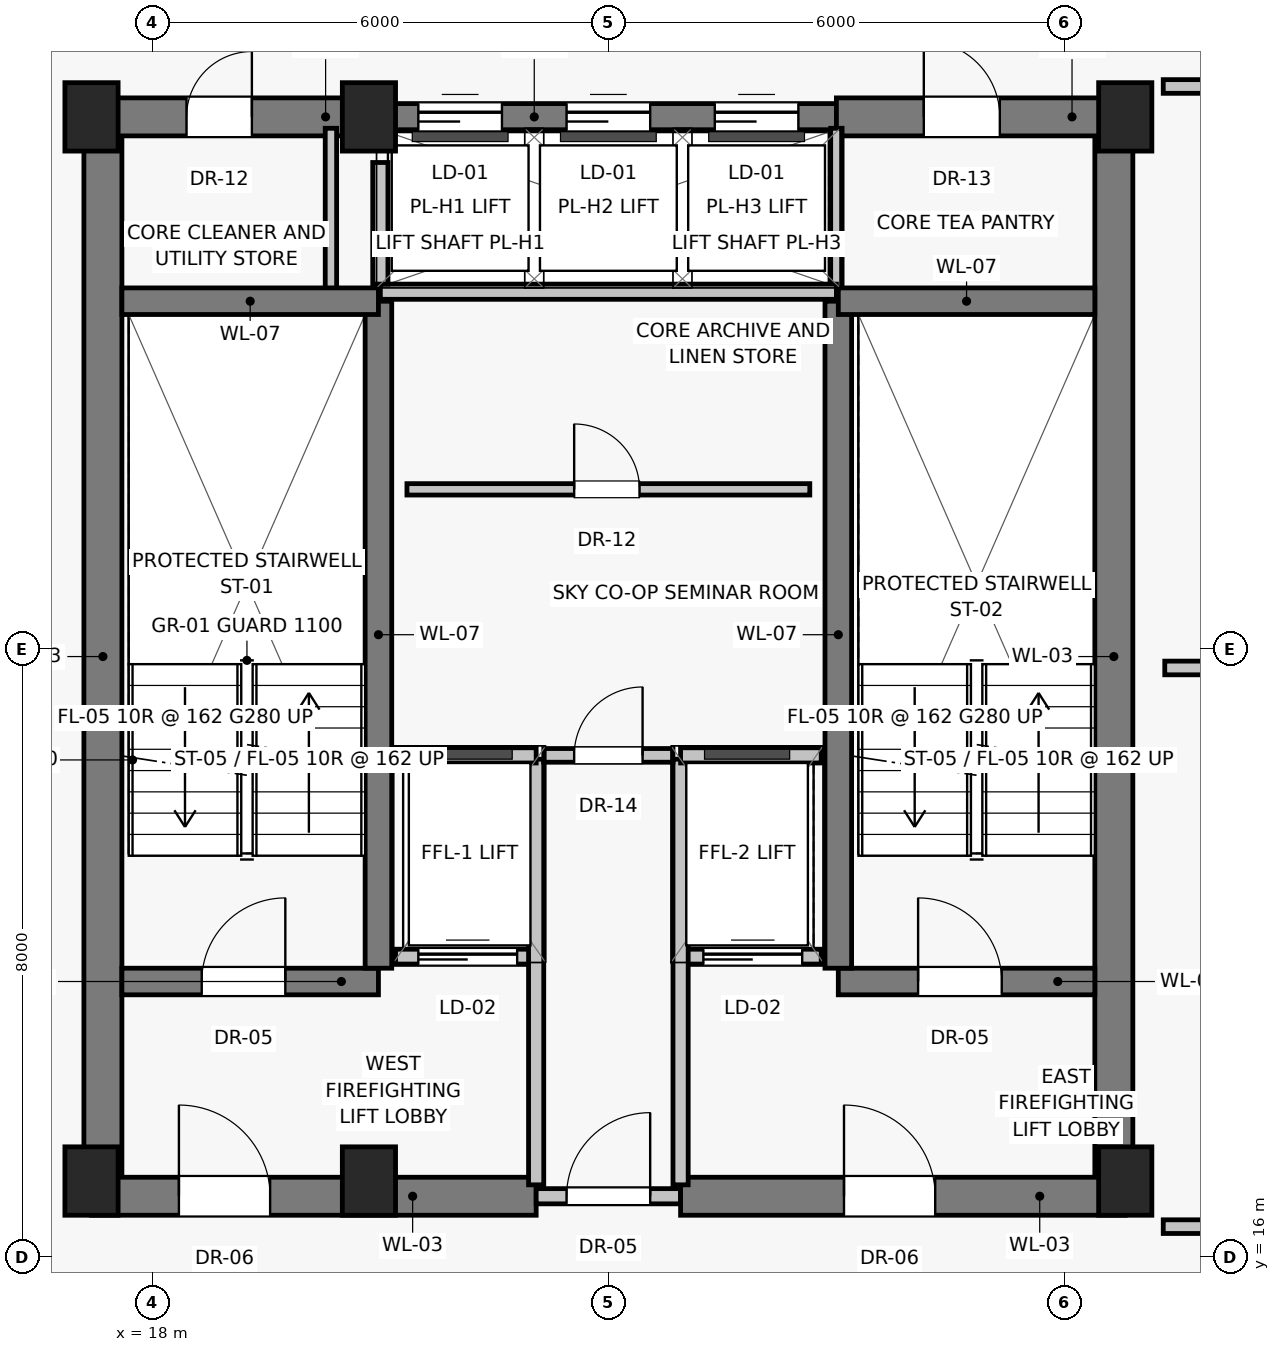
"""IFC4 building model, lengths in metres.
Left out: names, types, materials, properties, quantities, classifications, styles, units other than length and angle.
Written with IfcOpenShell. Run it as: python <this file> out.ifc"""

import sys

from ifc_helpers import new_model, si_unit, direction, frame, frame_2d, origin, origin_2d, place, context, subcontext, project, spatial, rectangle, extrude, source, transform, mapped, element, fill, save


model = new_model("IFC4")
c1 = context("Model", 3, precision=1e-05, world=origin(), true_north=direction((0.0, 1.0)))
c2 = subcontext(c1, "Body", "Model", "MODEL_VIEW")
j1 = project(units=[si_unit("LENGTHUNIT", "METRE"), si_unit("PLANEANGLEUNIT", "RADIAN")], contexts=[c1])
p1 = place(None, origin())
s1 = spatial("IfcSite", under=j1, at=p1, CompositionType="ELEMENT")
p2 = place(p1, origin())
s2 = spatial("IfcBuilding", under=s1, at=p2, CompositionType="ELEMENT")
p3 = place(p2, frame((0.0, 0.0, 201.6)))
s3 = spatial("IfcBuildingStorey", under=s2, at=p3, CompositionType="ELEMENT", Elevation=201.6)
for number, where, z_axis, x_axis in (
    (1, (17.2, 17.0, 0.0), (0.0, 0.0, 1.0), (1.0, 0.0, 0.0)),
    (2, (20.85, 17.0, 0.0), (0.0, 0.0, 1.0), (1.0, 0.0, 0.0)),
    (3, (30.8, 17.0, 0.0), (0.0, 0.0, 1.0), (1.0, 0.0, 0.0)),
    (4, (17.2, 31.0, 0.0), (0.0, 0.0, 1.0), (1.0, 0.0, 0.0)),
    (5, (20.85, 31.0, 0.0), (0.0, 0.0, 1.0), (1.0, 0.0, 0.0)),
    (6, (30.8, 31.0, 0.0), (0.0, 0.0, 1.0), (1.0, 0.0, 0.0)),
):
    element("IfcColumn", number, at=place(p3, frame(where, z_axis=z_axis, x_axis=x_axis)), inside=s3, PredefinedType="PILASTER", context=c2, shape_type="SweptSolid", body=[
        extrude(rectangle(XDim=0.7, YDim=0.9, at=origin_2d()), origin(), (0.0, 0.0, 1.0), 3.25),
    ])
for number, where, z_axis, x_axis in (
    (7, (17.35, 16.8, 0.0), (0.0, 0.0, 1.0), (0.0, 1.0, 0.0)),
    (8, (30.65, 16.8, 0.0), (0.0, 0.0, 1.0), (0.0, 1.0, 0.0)),
):
    element("IfcWall", number, at=place(p3, frame(where, z_axis=z_axis, x_axis=x_axis)), inside=s3, PredefinedType="SHEAR", context=c2, shape_type="SweptSolid", body=[
        extrude(rectangle(XDim=14.2, YDim=0.5, at=frame_2d((7.1, 0.0))), origin(), (0.0, 0.0, 1.0), 3.015),
    ])
p4 = place(p3, frame((17.2, 16.8, 0.0), z_axis=(0.0, 0.0, 1.0), x_axis=(1.0, 0.0, 0.0)))
e9 = element("IfcWall", 9, at=p4, inside=s3, PredefinedType="SHEAR", context=c2, shape_type="SweptSolid", body=[
    extrude(rectangle(XDim=5.85, YDim=0.5, at=frame_2d((2.925, 0.0))), origin(), (0.0, 0.0, 1.0), 3.015),
])
p5 = place(p4, frame((1.15, 0.0, 0.0)))
e10 = element("IfcOpeningElement", 10, at=p5, cuts=e9, PredefinedType="OPENING", context=c2, shape_type="SweptSolid", body=[
    extrude(rectangle(XDim=1.2, YDim=2.03, at=frame_2d((0.6, 1.015))), frame((0.0, 0.26, 0.0), z_axis=(0.0, -1.0, 0.0), x_axis=(1.0, 0.0, 0.0)), (0.0, 0.0, 1.0), 0.52),
])
p6 = place(p3, frame((23.05, 16.8, 0.0), z_axis=(0.0, 0.0, 1.0), x_axis=(1.0, 0.0, 0.0)))
e11 = element("IfcWall", 11, at=p6, inside=s3, PredefinedType="SOLIDWALL", context=c2, shape_type="SweptSolid", body=[
    extrude(rectangle(XDim=1.9, YDim=0.2, at=frame_2d((0.95, 0.0))), origin(), (0.0, 0.0, 1.0), 2.165),
])
p7 = place(p6, frame((0.4, 0.0, 0.0)))
e12 = element("IfcOpeningElement", 12, at=p7, cuts=e11, PredefinedType="OPENING", context=c2, shape_type="SweptSolid", body=[
    extrude(rectangle(XDim=1.1, YDim=2.03, at=frame_2d((0.55, 1.015))), frame((0.0, 0.11, 0.0), z_axis=(0.0, -1.0, 0.0), x_axis=(1.0, 0.0, 0.0)), (0.0, 0.0, 1.0), 0.22),
])
p8 = place(p3, frame((24.95, 16.8, 0.0), z_axis=(0.0, 0.0, 1.0), x_axis=(1.0, 0.0, 0.0)))
e13 = element("IfcWall", 13, at=p8, inside=s3, PredefinedType="SHEAR", context=c2, shape_type="SweptSolid", body=[
    extrude(rectangle(XDim=5.85, YDim=0.5, at=frame_2d((2.925, 0.0))), origin(), (0.0, 0.0, 1.0), 3.015),
])
p9 = place(p8, frame((2.15, 0.0, 0.0)))
e14 = element("IfcOpeningElement", 14, at=p9, cuts=e13, PredefinedType="OPENING", context=c2, shape_type="SweptSolid", body=[
    extrude(rectangle(XDim=1.2, YDim=2.03, at=frame_2d((0.6, 1.015))), frame((0.0, 0.26, 0.0), z_axis=(0.0, -1.0, 0.0), x_axis=(1.0, 0.0, 0.0)), (0.0, 0.0, 1.0), 0.52),
])
p10 = place(p3, frame((17.2, 31.0, 0.0), z_axis=(0.0, 0.0, 1.0), x_axis=(1.0, 0.0, 0.0)))
e15 = element("IfcWall", 15, at=p10, inside=s3, PredefinedType="SHEAR", context=c2, shape_type="SweptSolid", body=[
    extrude(rectangle(XDim=3.8, YDim=0.5, at=frame_2d((1.9, 0.0))), origin(), (0.0, 0.0, 1.0), 3.015),
])
p11 = place(p10, frame((1.25, 0.0, 0.0)))
e16 = element("IfcOpeningElement", 16, at=p11, cuts=e15, PredefinedType="OPENING", context=c2, shape_type="SweptSolid", body=[
    extrude(rectangle(XDim=0.86, YDim=2.01, at=frame_2d((0.43, 1.005))), frame((0.0, 0.26, 0.0), z_axis=(0.0, -1.0, 0.0), x_axis=(1.0, 0.0, 0.0)), (0.0, 0.0, 1.0), 0.52),
])
p12 = place(p3, frame((21.0, 31.0, 0.0), z_axis=(0.0, 0.0, 1.0), x_axis=(1.0, 0.0, 0.0)))
e17 = element("IfcWall", 17, at=p12, inside=s3, PredefinedType="SHEAR", context=c2, shape_type="SweptSolid", body=[
    extrude(rectangle(XDim=6.0, YDim=0.35, at=frame_2d((3.0, 0.0))), origin(), (0.0, 0.0, 1.0), 3.015),
])
p13 = place(p12, frame((0.5, 0.0, 0.0)))
e18 = element("IfcOpeningElement", 18, at=p13, cuts=e17, PredefinedType="OPENING", context=c2, shape_type="SweptSolid", body=[
    extrude(rectangle(XDim=1.1, YDim=2.08, at=frame_2d((0.55, 1.04))), frame((0.0, 0.185, 0.0), z_axis=(0.0, -1.0, 0.0), x_axis=(1.0, 0.0, 0.0)), (0.0, 0.0, 1.0), 0.37),
])
p14 = place(p12, frame((2.45, 0.0, 0.0)))
e19 = element("IfcOpeningElement", 19, at=p14, cuts=e17, PredefinedType="OPENING", context=c2, shape_type="SweptSolid", body=[
    extrude(rectangle(XDim=1.1, YDim=2.08, at=frame_2d((0.55, 1.04))), frame((0.0, 0.185, 0.0), z_axis=(0.0, -1.0, 0.0), x_axis=(1.0, 0.0, 0.0)), (0.0, 0.0, 1.0), 0.37),
])
p15 = place(p12, frame((4.4, 0.0, 0.0)))
e20 = element("IfcOpeningElement", 20, at=p15, cuts=e17, PredefinedType="OPENING", context=c2, shape_type="SweptSolid", body=[
    extrude(rectangle(XDim=1.1, YDim=2.08, at=frame_2d((0.55, 1.04))), frame((0.0, 0.185, 0.0), z_axis=(0.0, -1.0, 0.0), x_axis=(1.0, 0.0, 0.0)), (0.0, 0.0, 1.0), 0.37),
])
p16 = place(p3, frame((27.0, 31.0, 0.0), z_axis=(0.0, 0.0, 1.0), x_axis=(1.0, 0.0, 0.0)))
e21 = element("IfcWall", 21, at=p16, inside=s3, PredefinedType="SHEAR", context=c2, shape_type="SweptSolid", body=[
    extrude(rectangle(XDim=3.8, YDim=0.5, at=frame_2d((1.9, 0.0))), origin(), (0.0, 0.0, 1.0), 3.015),
])
p17 = place(p16, frame((1.15, 0.0, 0.0)))
e22 = element("IfcOpeningElement", 22, at=p17, cuts=e21, PredefinedType="OPENING", context=c2, shape_type="SweptSolid", body=[
    extrude(rectangle(XDim=1.0, YDim=2.01, at=frame_2d((0.5, 1.005))), frame((0.0, 0.26, 0.0), z_axis=(0.0, -1.0, 0.0), x_axis=(1.0, 0.0, 0.0)), (0.0, 0.0, 1.0), 0.52),
])
for number, where, z_axis, x_axis in (
    (23, (20.35, 28.65, 0.0), (0.0, 0.0, 1.0), (0.0, 1.0, 0.0)),
    (24, (27.0, 28.65, 0.0), (0.0, 0.0, 1.0), (0.0, 1.0, 0.0)),
):
    element("IfcWall", number, at=place(p3, frame(where, z_axis=z_axis, x_axis=x_axis)), inside=s3, PredefinedType="PARTITIONING", context=c2, shape_type="SweptSolid", body=[
        extrude(rectangle(XDim=2.2, YDim=0.15, at=frame_2d((1.1, 0.0))), origin(), (0.0, 0.0, 1.0), 3.015),
    ])
p18 = place(p3, frame((17.6, 19.625, 0.0), z_axis=(0.0, 0.0, 1.0), x_axis=(1.0, 0.0, 0.0)))
e25 = element("IfcWall", 25, at=p18, inside=s3, PredefinedType="SHEAR", context=c2, shape_type="SweptSolid", body=[
    extrude(rectangle(XDim=3.375, YDim=0.35, at=frame_2d((1.688, 0.0))), origin(), (0.0, 0.0, 1.0), 3.015),
])
p19 = place(p18, frame((1.05, 0.0, 0.0)))
e26 = element("IfcOpeningElement", 26, at=p19, cuts=e25, PredefinedType="OPENING", context=c2, shape_type="SweptSolid", body=[
    extrude(rectangle(XDim=1.1, YDim=2.03, at=frame_2d((0.55, 1.015))), frame((0.0, 0.185, 0.0), z_axis=(0.0, -1.0, 0.0), x_axis=(1.0, 0.0, 0.0)), (0.0, 0.0, 1.0), 0.37),
])
p20 = place(p3, frame((21.2, 19.95, 0.0), z_axis=(0.0, 0.0, 1.0), x_axis=(1.0, 0.0, 0.0)))
e27 = element("IfcWall", 27, at=p20, inside=s3, PredefinedType="SOLIDWALL", context=c2, shape_type="SweptSolid", body=[
    extrude(rectangle(XDim=1.85, YDim=0.2, at=frame_2d((0.925, 0.0))), origin(), (0.0, 0.0, 1.0), 3.015),
])
p21 = place(p20, frame((0.3, 0.0, 0.0)))
e28 = element("IfcOpeningElement", 28, at=p21, cuts=e27, PredefinedType="OPENING", context=c2, shape_type="SweptSolid", body=[
    extrude(rectangle(XDim=1.3, YDim=2.25, at=frame_2d((0.65, 1.125))), frame((0.0, 0.11, 0.0), z_axis=(0.0, -1.0, 0.0), x_axis=(1.0, 0.0, 0.0)), (0.0, 0.0, 1.0), 0.22),
])
p22 = place(p3, frame((24.95, 19.95, 0.0), z_axis=(0.0, 0.0, 1.0), x_axis=(1.0, 0.0, 0.0)))
e29 = element("IfcWall", 29, at=p22, inside=s3, PredefinedType="SOLIDWALL", context=c2, shape_type="SweptSolid", body=[
    extrude(rectangle(XDim=1.85, YDim=0.2, at=frame_2d((0.925, 0.0))), origin(), (0.0, 0.0, 1.0), 3.015),
])
p23 = place(p22, frame((0.3, 0.0, 0.0)))
e30 = element("IfcOpeningElement", 30, at=p23, cuts=e29, PredefinedType="OPENING", context=c2, shape_type="SweptSolid", body=[
    extrude(rectangle(XDim=1.3, YDim=2.25, at=frame_2d((0.65, 1.125))), frame((0.0, 0.11, 0.0), z_axis=(0.0, -1.0, 0.0), x_axis=(1.0, 0.0, 0.0)), (0.0, 0.0, 1.0), 0.22),
])
p24 = place(p3, frame((27.025, 19.625, 0.0), z_axis=(0.0, 0.0, 1.0), x_axis=(1.0, 0.0, 0.0)))
e31 = element("IfcWall", 31, at=p24, inside=s3, PredefinedType="SHEAR", context=c2, shape_type="SweptSolid", body=[
    extrude(rectangle(XDim=3.375, YDim=0.35, at=frame_2d((1.688, 0.0))), origin(), (0.0, 0.0, 1.0), 3.015),
])
p25 = place(p24, frame((1.05, 0.0, 0.0)))
e32 = element("IfcOpeningElement", 32, at=p25, cuts=e31, PredefinedType="OPENING", context=c2, shape_type="SweptSolid", body=[
    extrude(rectangle(XDim=1.1, YDim=2.03, at=frame_2d((0.55, 1.015))), frame((0.0, 0.185, 0.0), z_axis=(0.0, -1.0, 0.0), x_axis=(1.0, 0.0, 0.0)), (0.0, 0.0, 1.0), 0.37),
])
for number, where, z_axis, x_axis in (
    (33, (20.975, 19.8, 0.0), (0.0, 0.0, 1.0), (0.0, 1.0, 0.0)),
    (34, (27.025, 19.8, 0.0), (0.0, 0.0, 1.0), (0.0, 1.0, 0.0)),
):
    element("IfcWall", number, at=place(p3, frame(where, z_axis=z_axis, x_axis=x_axis)), inside=s3, PredefinedType="SHEAR", context=c2, shape_type="SweptSolid", body=[
        extrude(rectangle(XDim=8.775, YDim=0.35, at=frame_2d((4.387, 0.0))), origin(), (0.0, 0.0, 1.0), 3.015),
    ])
for number, where, z_axis, x_axis in (
    (35, (17.6, 28.575, 0.0), (0.0, 0.0, 1.0), (1.0, 0.0, 0.0)),
    (36, (27.025, 28.575, 0.0), (0.0, 0.0, 1.0), (1.0, 0.0, 0.0)),
):
    element("IfcWall", number, at=place(p3, frame(where, z_axis=z_axis, x_axis=x_axis)), inside=s3, PredefinedType="SHEAR", context=c2, shape_type="SweptSolid", body=[
        extrude(rectangle(XDim=3.375, YDim=0.35, at=frame_2d((1.688, 0.0))), origin(), (0.0, 0.0, 1.0), 3.015),
    ])
for number, where, z_axis, x_axis in (
    (37, (23.05, 16.95, 0.0), (0.0, 0.0, 1.0), (0.0, 1.0, 0.0)),
    (38, (24.95, 16.95, 0.0), (0.0, 0.0, 1.0), (0.0, 1.0, 0.0)),
):
    element("IfcWall", number, at=place(p3, frame(where, z_axis=z_axis, x_axis=x_axis)), inside=s3, PredefinedType="SOLIDWALL", context=c2, shape_type="SweptSolid", body=[
        extrude(rectangle(XDim=5.6, YDim=0.2, at=frame_2d((2.8, 0.0))), origin(), (0.0, 0.0, 1.0), 3.015),
    ])
for number, where, z_axis, x_axis in (
    (39, (21.2, 22.6, 0.0), (0.0, 0.0, 1.0), (1.0, 0.0, 0.0)),
    (40, (24.95, 22.6, 0.0), (0.0, 0.0, 1.0), (1.0, 0.0, 0.0)),
):
    element("IfcWall", number, at=place(p3, frame(where, z_axis=z_axis, x_axis=x_axis)), inside=s3, PredefinedType="SOLIDWALL", context=c2, shape_type="SweptSolid", body=[
        extrude(rectangle(XDim=1.85, YDim=0.2, at=frame_2d((0.925, 0.0))), origin(), (0.0, 0.0, 1.0), 3.015),
    ])
p26 = place(p3, frame((21.0, 28.7, 0.0), z_axis=(0.0, 0.0, 1.0), x_axis=(1.0, 0.0, 0.0)))
e41 = element("IfcWall", 41, at=p26, inside=s3, PredefinedType="SOLIDWALL", context=c2, shape_type="SweptSolid", body=[
    extrude(rectangle(XDim=6.0, YDim=0.2, at=frame_2d((3.0, 0.0))), origin(), (0.0, 0.0, 1.0), 3.015),
])
p27 = place(p3, frame((21.0, 28.8, 0.0), z_axis=(0.0, 0.0, 1.0), x_axis=(0.0, 1.0, 0.0)))
e42 = element("IfcWall", 42, at=p27, inside=s3, PredefinedType="SOLIDWALL", context=c2, shape_type="SweptSolid", body=[
    extrude(rectangle(XDim=1.6, YDim=0.2, at=frame_2d((0.8, 0.0))), origin(), (0.0, 0.0, 1.0), 3.015),
])
p28 = place(p3, frame((23.15, 22.6, 0.0), z_axis=(0.0, 0.0, 1.0), x_axis=(1.0, 0.0, 0.0)))
e43 = element("IfcWall", 43, at=p28, inside=s3, PredefinedType="PARTITIONING", context=c2, shape_type="SweptSolid", body=[
    extrude(rectangle(XDim=1.7, YDim=0.18, at=frame_2d((0.85, 0.0))), origin(), (0.0, 0.0, 1.0), 3.015),
])
p29 = place(p28, frame((0.4, 0.0, 0.0)))
e44 = element("IfcOpeningElement", 44, at=p29, cuts=e43, PredefinedType="OPENING", context=c2, shape_type="SweptSolid", body=[
    extrude(rectangle(XDim=0.9, YDim=2.01, at=frame_2d((0.45, 1.005))), frame((0.0, 0.1, 0.0), z_axis=(0.0, -1.0, 0.0), x_axis=(1.0, 0.0, 0.0)), (0.0, 0.0, 1.0), 0.2),
])
p30 = place(p3, frame((21.35, 26.1, 0.0), z_axis=(0.0, 0.0, 1.0), x_axis=(1.0, 0.0, 0.0)))
e45 = element("IfcWall", 45, at=p30, inside=s3, PredefinedType="PARTITIONING", context=c2, shape_type="SweptSolid", body=[
    extrude(rectangle(XDim=5.3, YDim=0.15, at=frame_2d((2.65, 0.0))), origin(), (0.0, 0.0, 1.0), 3.015),
])
p31 = place(p30, frame((2.2, 0.0, 0.0)))
e46 = element("IfcOpeningElement", 46, at=p31, cuts=e45, PredefinedType="OPENING", context=c2, shape_type="SweptSolid", body=[
    extrude(rectangle(XDim=0.86, YDim=2.01, at=frame_2d((0.43, 1.005))), frame((0.0, 0.085, 0.0), z_axis=(0.0, -1.0, 0.0), x_axis=(1.0, 0.0, 0.0)), (0.0, 0.0, 1.0), 0.17),
])
p32 = place(p3, frame((31.32, 23.75, 0.0), z_axis=(0.0, 0.0, 1.0), x_axis=(1.0, 0.0, 0.0)))
e47 = element("IfcWall", 47, at=p32, inside=s3, PredefinedType="PARTITIONING", context=c2, shape_type="SweptSolid", body=[
    extrude(rectangle(XDim=10.431, YDim=0.18, at=frame_2d((5.216, 0.0))), origin(), (0.0, 0.0, 1.0), 3.015),
])
p33 = place(p3, frame((31.3, 16.4, 0.0), z_axis=(0.0, 0.0, 1.0), x_axis=(1.0, 0.0, 0.0)))
e48 = element("IfcWall", 48, at=p33, inside=s3, PredefinedType="PARTITIONING", context=c2, shape_type="SweptSolid", body=[
    extrude(rectangle(XDim=1.92, YDim=0.18, at=frame_2d((0.96, 0.0))), origin(), (0.0, 0.0, 1.0), 3.015),
])
p34 = place(p33, frame((0.72, 0.0, 0.0)))
e49 = element("IfcOpeningElement", 49, at=p34, cuts=e48, PredefinedType="OPENING", context=c2, shape_type="SweptSolid", body=[
    extrude(rectangle(XDim=1.0, YDim=2.01, at=frame_2d((0.5, 1.005))), frame((0.0, 0.1, 0.0), z_axis=(0.0, -1.0, 0.0), x_axis=(1.0, 0.0, 0.0)), (0.0, 0.0, 1.0), 0.2),
])
p35 = place(p3, frame((31.3, 31.4, 0.0), z_axis=(0.0, 0.0, 1.0), x_axis=(1.0, 0.0, 0.0)))
e50 = element("IfcWall", 50, at=p35, inside=s3, PredefinedType="PARTITIONING", context=c2, shape_type="SweptSolid", body=[
    extrude(rectangle(XDim=1.92, YDim=0.18, at=frame_2d((0.96, 0.0))), origin(), (0.0, 0.0, 1.0), 3.015),
])
p36 = place(p35, frame((0.72, 0.0, 0.0)))
e51 = element("IfcOpeningElement", 51, at=p36, cuts=e50, PredefinedType="OPENING", context=c2, shape_type="SweptSolid", body=[
    extrude(rectangle(XDim=1.0, YDim=2.01, at=frame_2d((0.5, 1.005))), frame((0.0, 0.1, 0.0), z_axis=(0.0, -1.0, 0.0), x_axis=(1.0, 0.0, 0.0)), (0.0, 0.0, 1.0), 0.2),
])
m1 = source(origin(), c2, "Body", "SweptSolid", [
    extrude(rectangle(XDim=1.2, YDim=2.03, at=frame_2d((0.6, 1.015))), frame((0.0, 0.025, 0.0), z_axis=(0.0, -1.0, 0.0), x_axis=(1.0, 0.0, 0.0)), (0.0, 0.0, 1.0), 0.05),
])
p37 = place(p5, origin())
e52 = element("IfcDoor", 52, at=p37, inside=s3, OperationType="SINGLE_SWING_LEFT", PredefinedType="DOOR", context=c2, shape_type="MappedRepresentation", body=[
    mapped(m1, transform((0.0, 0.0, 0.0), scale=1.0)),
])
fill(e10, e52)
m2 = source(origin(), c2, "Body", "SweptSolid", [
    extrude(rectangle(XDim=1.1, YDim=2.03, at=frame_2d((0.55, 1.015))), frame((0.0, 0.025, 0.0), z_axis=(0.0, -1.0, 0.0), x_axis=(1.0, 0.0, 0.0)), (0.0, 0.0, 1.0), 0.05),
])
p38 = place(p7, origin())
e53 = element("IfcDoor", 53, at=p38, inside=s3, OperationType="SINGLE_SWING_RIGHT", PredefinedType="DOOR", context=c2, shape_type="MappedRepresentation", body=[
    mapped(m2, transform((0.0, 0.0, 0.0), scale=1.0)),
])
fill(e12, e53)
p39 = place(p9, origin())
e54 = element("IfcDoor", 54, at=p39, inside=s3, OperationType="SINGLE_SWING_LEFT", PredefinedType="DOOR", context=c2, shape_type="MappedRepresentation", body=[
    mapped(m1, transform((0.0, 0.0, 0.0), scale=1.0)),
])
fill(e14, e54)
m3 = source(origin(), c2, "Body", "SweptSolid", [
    extrude(rectangle(XDim=0.86, YDim=2.01, at=frame_2d((0.43, 1.005))), frame((0.0, 0.025, 0.0), z_axis=(0.0, -1.0, 0.0), x_axis=(1.0, 0.0, 0.0)), (0.0, 0.0, 1.0), 0.05),
])
p40 = place(p11, origin())
e55 = element("IfcDoor", 55, at=p40, inside=s3, OperationType="SINGLE_SWING_RIGHT", PredefinedType="DOOR", context=c2, shape_type="MappedRepresentation", body=[
    mapped(m3, transform((0.0, 0.0, 0.0), scale=1.0)),
])
fill(e16, e55)
m4 = source(origin(), c2, "Body", "SweptSolid", [
    extrude(rectangle(XDim=1.1, YDim=2.08, at=frame_2d((0.55, 1.04))), frame((0.0, 0.025, 0.0), z_axis=(0.0, -1.0, 0.0), x_axis=(1.0, 0.0, 0.0)), (0.0, 0.0, 1.0), 0.05),
])
p41 = place(p13, origin())
e56 = element("IfcDoor", 56, at=p41, inside=s3, OperationType="SLIDING_TO_LEFT", PredefinedType="DOOR", context=c2, shape_type="MappedRepresentation", body=[
    mapped(m4, transform((0.0, 0.0, 0.0), scale=1.0)),
])
fill(e18, e56)
p42 = place(p14, origin())
e57 = element("IfcDoor", 57, at=p42, inside=s3, OperationType="SLIDING_TO_LEFT", PredefinedType="DOOR", context=c2, shape_type="MappedRepresentation", body=[
    mapped(m4, transform((0.0, 0.0, 0.0), scale=1.0)),
])
fill(e19, e57)
p43 = place(p15, origin())
e58 = element("IfcDoor", 58, at=p43, inside=s3, OperationType="SLIDING_TO_LEFT", PredefinedType="DOOR", context=c2, shape_type="MappedRepresentation", body=[
    mapped(m4, transform((0.0, 0.0, 0.0), scale=1.0)),
])
fill(e20, e58)
m5 = source(origin(), c2, "Body", "SweptSolid", [
    extrude(rectangle(XDim=1.0, YDim=2.01, at=frame_2d((0.5, 1.005))), frame((0.0, 0.025, 0.0), z_axis=(0.0, -1.0, 0.0), x_axis=(1.0, 0.0, 0.0)), (0.0, 0.0, 1.0), 0.05),
])
p44 = place(p17, origin())
e59 = element("IfcDoor", 59, at=p44, inside=s3, OperationType="SINGLE_SWING_LEFT", PredefinedType="DOOR", context=c2, shape_type="MappedRepresentation", body=[
    mapped(m5, transform((0.0, 0.0, 0.0), scale=1.0)),
])
fill(e22, e59)
p45 = place(p19, origin())
e60 = element("IfcDoor", 60, at=p45, inside=s3, OperationType="SINGLE_SWING_RIGHT", PredefinedType="DOOR", context=c2, shape_type="MappedRepresentation", body=[
    mapped(m2, transform((0.0, 0.0, 0.0), scale=1.0)),
])
fill(e26, e60)
m6 = source(origin(), c2, "Body", "SweptSolid", [
    extrude(rectangle(XDim=1.3, YDim=2.25, at=frame_2d((0.65, 1.125))), frame((0.0, 0.025, 0.0), z_axis=(0.0, -1.0, 0.0), x_axis=(1.0, 0.0, 0.0)), (0.0, 0.0, 1.0), 0.05),
])
p46 = place(p21, origin())
e61 = element("IfcDoor", 61, at=p46, inside=s3, OperationType="SLIDING_TO_LEFT", PredefinedType="DOOR", context=c2, shape_type="MappedRepresentation", body=[
    mapped(m6, transform((0.0, 0.0, 0.0), scale=1.0)),
])
fill(e28, e61)
p47 = place(p23, origin())
e62 = element("IfcDoor", 62, at=p47, inside=s3, OperationType="SLIDING_TO_LEFT", PredefinedType="DOOR", context=c2, shape_type="MappedRepresentation", body=[
    mapped(m6, transform((0.0, 0.0, 0.0), scale=1.0)),
])
fill(e30, e62)
p48 = place(p25, origin())
e63 = element("IfcDoor", 63, at=p48, inside=s3, OperationType="SINGLE_SWING_LEFT", PredefinedType="DOOR", context=c2, shape_type="MappedRepresentation", body=[
    mapped(m2, transform((0.0, 0.0, 0.0), scale=1.0)),
])
fill(e32, e63)
m7 = source(origin(), c2, "Body", "SweptSolid", [
    extrude(rectangle(XDim=0.9, YDim=2.01, at=frame_2d((0.45, 1.005))), frame((0.0, 0.025, 0.0), z_axis=(0.0, -1.0, 0.0), x_axis=(1.0, 0.0, 0.0)), (0.0, 0.0, 1.0), 0.05),
])
p49 = place(p29, origin())
e64 = element("IfcDoor", 64, at=p49, inside=s3, OperationType="SINGLE_SWING_RIGHT", PredefinedType="DOOR", context=c2, shape_type="MappedRepresentation", body=[
    mapped(m7, transform((0.0, 0.0, 0.0), scale=1.0)),
])
fill(e44, e64)
p50 = place(p31, origin())
e65 = element("IfcDoor", 65, at=p50, inside=s3, OperationType="SINGLE_SWING_LEFT", PredefinedType="DOOR", context=c2, shape_type="MappedRepresentation", body=[
    mapped(m3, transform((0.0, 0.0, 0.0), scale=1.0)),
])
fill(e46, e65)
save(model, sys.argv[1])
